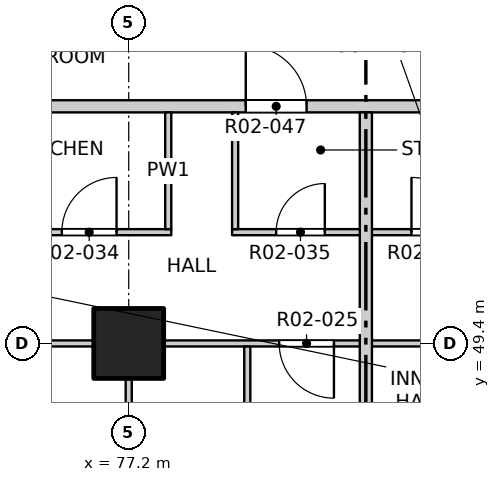
"""IFC4 building model, lengths in metres.
Left out: names, types, materials, properties, quantities, classifications, styles, units other than length and angle.
Written with IfcOpenShell. Run it as: python <this file> out.ifc"""

import sys

from ifc_helpers import new_model, si_unit, direction, frame, frame_2d, origin, origin_2d, place, context, subcontext, project, spatial, rectangle, extrude, element, fill, save


model = new_model("IFC4")
c1 = context("Model", 3, precision=1e-05, world=origin(), true_north=direction((0.0, 1.0)))
c2 = subcontext(c1, "Body", "Model", "MODEL_VIEW")
j1 = project(units=[si_unit("LENGTHUNIT", "METRE"), si_unit("PLANEANGLEUNIT", "RADIAN")], contexts=[c1])
p1 = place(None, origin())
s1 = spatial("IfcSite", under=j1, at=p1, CompositionType="ELEMENT")
p2 = place(p1, origin())
s2 = spatial("IfcBuilding", under=s1, at=p2, CompositionType="ELEMENT")
p3 = place(p2, frame((0.0, 0.0, 36.5)))
s3 = spatial("IfcBuildingStorey", under=s2, at=p3, CompositionType="ELEMENT", Elevation=36.5)
p4 = place(p3, frame((77.2, 49.4, -0.25), z_axis=(0.0, 0.0, 1.0), x_axis=(1.0, 0.0, 0.0)))
e1 = element("IfcColumn", 1, at=p4, inside=s3, PredefinedType="COLUMN", context=c2, shape_type="SweptSolid", body=[
    extrude(rectangle(XDim=1.15, YDim=1.15, at=origin_2d()), origin(), (0.0, 0.0, 1.0), 3.4),
])
p5 = place(p3, frame((73.2, 49.4, 0.0), z_axis=(0.0, 0.0, 1.0), x_axis=(1.0, 0.0, 0.0)))
e2 = element("IfcWall", 2, at=p5, inside=s3, PredefinedType="PARTITIONING", context=c2, shape_type="SweptSolid", body=[
    extrude(rectangle(XDim=23.6, YDim=0.1, at=frame_2d((11.8, 0.0))), origin(), (0.0, 0.0, 1.0), 3.15),
])
p6 = place(p5, frame((1.6, 0.0, 0.0)))
e3 = element("IfcOpeningElement", 3, at=p6, cuts=e2, PredefinedType="OPENING", context=c2, shape_type="SweptSolid", body=[
    extrude(rectangle(XDim=0.9, YDim=2.1, at=frame_2d((0.45, 1.05))), frame((0.0, 0.06, 0.0), z_axis=(0.0, -1.0, 0.0), x_axis=(1.0, 0.0, 0.0)), (0.0, 0.0, 1.0), 0.12),
])
p7 = place(p5, frame((6.475, 0.0, 0.0)))
e4 = element("IfcOpeningElement", 4, at=p7, cuts=e2, PredefinedType="OPENING", context=c2, shape_type="SweptSolid", body=[
    extrude(rectangle(XDim=0.9, YDim=2.1, at=frame_2d((0.45, 1.05))), frame((0.0, 0.06, 0.0), z_axis=(0.0, -1.0, 0.0), x_axis=(1.0, 0.0, 0.0)), (0.0, 0.0, 1.0), 0.12),
])
p8 = place(p5, frame((10.2, 0.0, 0.0)))
e5 = element("IfcOpeningElement", 5, at=p8, cuts=e2, PredefinedType="OPENING", context=c2, shape_type="SweptSolid", body=[
    extrude(rectangle(XDim=0.9, YDim=2.1, at=frame_2d((0.45, 1.05))), frame((0.0, 0.06, 0.0), z_axis=(0.0, -1.0, 0.0), x_axis=(1.0, 0.0, 0.0)), (0.0, 0.0, 1.0), 0.12),
])
p9 = place(p5, frame((13.3, 0.0, 0.0)))
e6 = element("IfcOpeningElement", 6, at=p9, cuts=e2, PredefinedType="OPENING", context=c2, shape_type="SweptSolid", body=[
    extrude(rectangle(XDim=0.9, YDim=2.1, at=frame_2d((0.45, 1.05))), frame((0.0, 0.06, 0.0), z_axis=(0.0, -1.0, 0.0), x_axis=(1.0, 0.0, 0.0)), (0.0, 0.0, 1.0), 0.12),
])
p10 = place(p5, frame((18.0, 0.0, 0.0)))
e7 = element("IfcOpeningElement", 7, at=p10, cuts=e2, PredefinedType="OPENING", context=c2, shape_type="SweptSolid", body=[
    extrude(rectangle(XDim=0.9, YDim=2.1, at=frame_2d((0.45, 1.05))), frame((0.0, 0.06, 0.0), z_axis=(0.0, -1.0, 0.0), x_axis=(1.0, 0.0, 0.0)), (0.0, 0.0, 1.0), 0.12),
])
p11 = place(p5, frame((21.1, 0.0, 0.0)))
e8 = element("IfcOpeningElement", 8, at=p11, cuts=e2, PredefinedType="OPENING", context=c2, shape_type="SweptSolid", body=[
    extrude(rectangle(XDim=0.9, YDim=2.1, at=frame_2d((0.45, 1.05))), frame((0.0, 0.06, 0.0), z_axis=(0.0, -1.0, 0.0), x_axis=(1.0, 0.0, 0.0)), (0.0, 0.0, 1.0), 0.12),
])
p12 = place(p3, frame((73.2, 51.23, 0.0), z_axis=(0.0, 0.0, 1.0), x_axis=(1.0, 0.0, 0.0)))
e9 = element("IfcWall", 9, at=p12, inside=s3, PredefinedType="PARTITIONING", context=c2, shape_type="SweptSolid", body=[
    extrude(rectangle(XDim=4.7, YDim=0.1, at=frame_2d((2.35, 0.0))), origin(), (0.0, 0.0, 1.0), 3.15),
])
p13 = place(p12, frame((0.625, 0.0, 0.0)))
e10 = element("IfcOpeningElement", 10, at=p13, cuts=e9, PredefinedType="OPENING", context=c2, shape_type="SweptSolid", body=[
    extrude(rectangle(XDim=0.9, YDim=2.1, at=frame_2d((0.45, 1.05))), frame((0.0, 0.06, 0.0), z_axis=(0.0, -1.0, 0.0), x_axis=(1.0, 0.0, 0.0)), (0.0, 0.0, 1.0), 0.12),
])
p14 = place(p12, frame((2.9, 0.0, 0.0)))
e11 = element("IfcOpeningElement", 11, at=p14, cuts=e9, PredefinedType="OPENING", context=c2, shape_type="SweptSolid", body=[
    extrude(rectangle(XDim=0.9, YDim=2.1, at=frame_2d((0.45, 1.05))), frame((0.0, 0.06, 0.0), z_axis=(0.0, -1.0, 0.0), x_axis=(1.0, 0.0, 0.0)), (0.0, 0.0, 1.0), 0.12),
])
p15 = place(p3, frame((78.9, 51.23, 0.0), z_axis=(0.0, 0.0, 1.0), x_axis=(1.0, 0.0, 0.0)))
e12 = element("IfcWall", 12, at=p15, inside=s3, PredefinedType="PARTITIONING", context=c2, shape_type="SweptSolid", body=[
    extrude(rectangle(XDim=11.0, YDim=0.1, at=frame_2d((5.5, 0.0))), origin(), (0.0, 0.0, 1.0), 3.15),
])
p16 = place(p15, frame((0.725, 0.0, 0.0)))
e13 = element("IfcOpeningElement", 13, at=p16, cuts=e12, PredefinedType="OPENING", context=c2, shape_type="SweptSolid", body=[
    extrude(rectangle(XDim=0.8, YDim=2.1, at=frame_2d((0.4, 1.05))), frame((0.0, 0.06, 0.0), z_axis=(0.0, -1.0, 0.0), x_axis=(1.0, 0.0, 0.0)), (0.0, 0.0, 1.0), 0.12),
])
p17 = place(p15, frame((2.95, 0.0, 0.0)))
e14 = element("IfcOpeningElement", 14, at=p17, cuts=e12, PredefinedType="OPENING", context=c2, shape_type="SweptSolid", body=[
    extrude(rectangle(XDim=0.9, YDim=2.1, at=frame_2d((0.45, 1.05))), frame((0.0, 0.06, 0.0), z_axis=(0.0, -1.0, 0.0), x_axis=(1.0, 0.0, 0.0)), (0.0, 0.0, 1.0), 0.12),
])
p18 = place(p15, frame((5.575, 0.0, 0.0)))
e15 = element("IfcOpeningElement", 15, at=p18, cuts=e12, PredefinedType="OPENING", context=c2, shape_type="SweptSolid", body=[
    extrude(rectangle(XDim=0.8, YDim=2.1, at=frame_2d((0.4, 1.05))), frame((0.0, 0.06, 0.0), z_axis=(0.0, -1.0, 0.0), x_axis=(1.0, 0.0, 0.0)), (0.0, 0.0, 1.0), 0.12),
])
p19 = place(p15, frame((8.7, 0.0, 0.0)))
e16 = element("IfcOpeningElement", 16, at=p19, cuts=e12, PredefinedType="OPENING", context=c2, shape_type="SweptSolid", body=[
    extrude(rectangle(XDim=0.9, YDim=2.1, at=frame_2d((0.45, 1.05))), frame((0.0, 0.06, 0.0), z_axis=(0.0, -1.0, 0.0), x_axis=(1.0, 0.0, 0.0)), (0.0, 0.0, 1.0), 0.12),
])
p20 = place(p3, frame((73.2, 53.3, 0.0), z_axis=(0.0, 0.0, 1.0), x_axis=(1.0, 0.0, 0.0)))
e17 = element("IfcWall", 17, at=p20, inside=s3, PredefinedType="PARTITIONING", context=c2, shape_type="SweptSolid", body=[
    extrude(rectangle(XDim=23.6, YDim=0.2, at=frame_2d((11.8, 0.0))), origin(), (0.0, 0.0, 1.0), 3.15),
])
p21 = place(p20, frame((5.925, 0.0, 0.0)))
e18 = element("IfcOpeningElement", 18, at=p21, cuts=e17, PredefinedType="OPENING", context=c2, shape_type="SweptSolid", body=[
    extrude(rectangle(XDim=1.0, YDim=2.1, at=frame_2d((0.5, 1.05))), frame((0.0, 0.11, 0.0), z_axis=(0.0, -1.0, 0.0), x_axis=(1.0, 0.0, 0.0)), (0.0, 0.0, 1.0), 0.22),
])
p22 = place(p20, frame((17.925, 0.0, 0.0)))
e19 = element("IfcOpeningElement", 19, at=p22, cuts=e17, PredefinedType="OPENING", context=c2, shape_type="SweptSolid", body=[
    extrude(rectangle(XDim=1.0, YDim=2.1, at=frame_2d((0.5, 1.05))), frame((0.0, 0.11, 0.0), z_axis=(0.0, -1.0, 0.0), x_axis=(1.0, 0.0, 0.0)), (0.0, 0.0, 1.0), 0.22),
])
p23 = place(p3, frame((77.2, 41.9, 0.0), z_axis=(0.0, 0.0, 1.0), x_axis=(0.0, 1.0, 0.0)))
e20 = element("IfcWall", 20, at=p23, inside=s3, PredefinedType="PARTITIONING", context=c2, shape_type="SweptSolid", body=[
    extrude(rectangle(XDim=7.45, YDim=0.1, at=frame_2d((3.725, 0.0))), origin(), (0.0, 0.0, 1.0), 2.55),
])
for number, where, z_axis, x_axis in (
    (21, (77.85, 51.28, 0.0), (0.0, 0.0, 1.0), (0.0, 1.0, 0.0)),
    (22, (78.95, 51.28, 0.0), (0.0, 0.0, 1.0), (0.0, 1.0, 0.0)),
):
    element("IfcWall", number, at=place(p3, frame(where, z_axis=z_axis, x_axis=x_axis)), inside=s3, PredefinedType="PARTITIONING", context=c2, shape_type="SweptSolid", body=[
        extrude(rectangle(XDim=1.92, YDim=0.1, at=frame_2d((0.96, 0.0))), origin(), (0.0, 0.0, 1.0), 3.15),
    ])
p24 = place(p3, frame((79.15, 45.85, 0.0), z_axis=(0.0, 0.0, 1.0), x_axis=(0.0, 1.0, 0.0)))
e23 = element("IfcWall", 23, at=p24, inside=s3, PredefinedType="PARTITIONING", context=c2, shape_type="SweptSolid", body=[
    extrude(rectangle(XDim=3.5, YDim=0.1, at=frame_2d((1.75, 0.0))), origin(), (0.0, 0.0, 1.0), 3.15),
])
p25 = place(p3, frame((81.1, 41.9, 0.0), z_axis=(0.0, 0.0, 1.0), x_axis=(0.0, 1.0, 0.0)))
e24 = element("IfcWall", 24, at=p25, inside=s3, PredefinedType="PARTITIONING", context=c2, shape_type="SweptSolid", body=[
    extrude(rectangle(XDim=11.3, YDim=0.2, at=frame_2d((5.65, 0.0))), origin(), (0.0, 0.0, 1.0), 3.15),
])
p26 = place(p7, origin())
e25 = element("IfcDoor", 25, at=p26, inside=s3, OperationType="SINGLE_SWING_LEFT", PredefinedType="DOOR", context=c2, shape_type="SweptSolid", body=[
    extrude(rectangle(XDim=0.9, YDim=2.1, at=frame_2d((0.45, 1.05))), frame((0.0, 0.025, 0.0), z_axis=(0.0, -1.0, 0.0), x_axis=(1.0, 0.0, 0.0)), (0.0, 0.0, 1.0), 0.05),
])
fill(e4, e25)
p27 = place(p14, origin())
e26 = element("IfcDoor", 26, at=p27, inside=s3, OperationType="SINGLE_SWING_RIGHT", PredefinedType="DOOR", context=c2, shape_type="SweptSolid", body=[
    extrude(rectangle(XDim=0.9, YDim=2.1, at=frame_2d((0.45, 1.05))), frame((0.0, 0.025, 0.0), z_axis=(0.0, -1.0, 0.0), x_axis=(1.0, 0.0, 0.0)), (0.0, 0.0, 1.0), 0.05),
])
fill(e11, e26)
p28 = place(p16, origin())
e27 = element("IfcDoor", 27, at=p28, inside=s3, OperationType="SINGLE_SWING_RIGHT", PredefinedType="DOOR", context=c2, shape_type="SweptSolid", body=[
    extrude(rectangle(XDim=0.8, YDim=2.1, at=frame_2d((0.4, 1.05))), frame((0.0, 0.025, 0.0), z_axis=(0.0, -1.0, 0.0), x_axis=(1.0, 0.0, 0.0)), (0.0, 0.0, 1.0), 0.05),
])
fill(e13, e27)
p29 = place(p17, origin())
e28 = element("IfcDoor", 28, at=p29, inside=s3, OperationType="SINGLE_SWING_LEFT", PredefinedType="DOOR", context=c2, shape_type="SweptSolid", body=[
    extrude(rectangle(XDim=0.9, YDim=2.1, at=frame_2d((0.45, 1.05))), frame((0.0, 0.025, 0.0), z_axis=(0.0, -1.0, 0.0), x_axis=(1.0, 0.0, 0.0)), (0.0, 0.0, 1.0), 0.05),
])
fill(e14, e28)
p30 = place(p21, origin())
e29 = element("IfcDoor", 29, at=p30, inside=s3, OperationType="SINGLE_SWING_LEFT", PredefinedType="DOOR", context=c2, shape_type="SweptSolid", body=[
    extrude(rectangle(XDim=1.0, YDim=2.1, at=frame_2d((0.5, 1.05))), frame((0.0, 0.025, 0.0), z_axis=(0.0, -1.0, 0.0), x_axis=(1.0, 0.0, 0.0)), (0.0, 0.0, 1.0), 0.05),
])
fill(e18, e29)
save(model, sys.argv[1])
